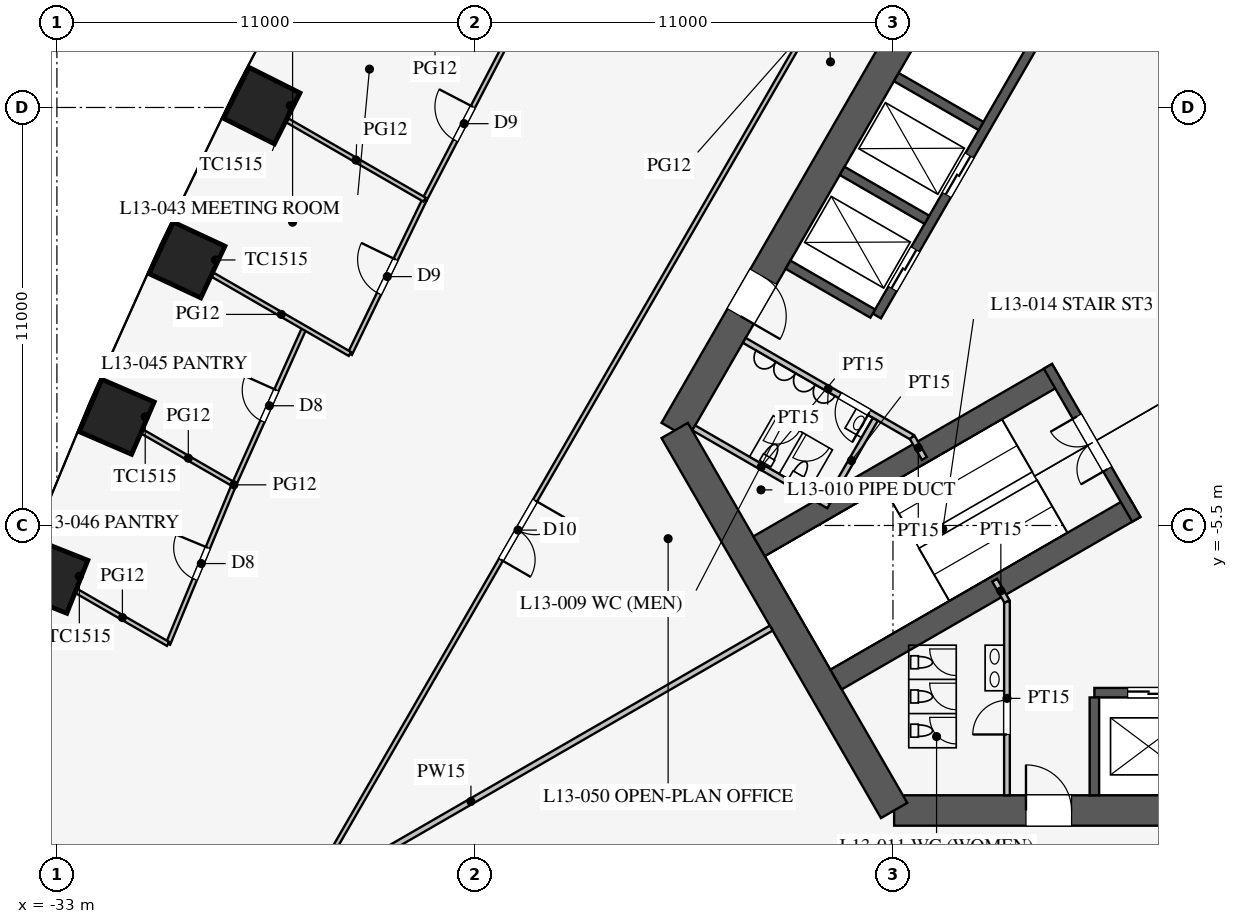
"""IFC4 building model, lengths in metres.
Left out: names, types, materials, properties, quantities, classifications, styles, units other than length and angle.
Written with IfcOpenShell. Run it as: python <this file> out.ifc"""

import sys

from ifc_helpers import new_model, si_unit, direction, frame, frame_2d, origin, origin_2d, place, context, subcontext, project, spatial, rectangle, extrude, element, fill, save


model = new_model("IFC4")
c1 = context("Model", 3, precision=1e-05, world=origin(), true_north=direction((0.0, 1.0)))
c2 = subcontext(c1, "Body", "Model", "MODEL_VIEW")
j1 = project(units=[si_unit("LENGTHUNIT", "METRE"), si_unit("PLANEANGLEUNIT", "RADIAN")], contexts=[c1])
p1 = place(None, origin())
s1 = spatial("IfcSite", under=j1, at=p1, CompositionType="ELEMENT")
p2 = place(p1, origin())
s2 = spatial("IfcBuilding", under=s1, at=p2, CompositionType="ELEMENT")
p3 = place(p2, frame((0.0, 0.0, 58.5)))
s3 = spatial("IfcBuildingStorey", under=s2, at=p3, CompositionType="ELEMENT", Elevation=58.5)
for number, where, z_axis, x_axis in (
    (1, (-27.611, 5.549, 0.0), (0.0, 0.0, 1.0), (-0.449, -0.894, 0.0)),
    (2, (-29.576, 1.487, 0.0), (0.0, 0.0, 1.0), (-0.423, -0.906, 0.0)),
    (3, (-31.426, -2.641, 0.0), (0.0, 0.0, 1.0), (-0.396, -0.918, 0.0)),
    (4, (-33.16, -6.836, 0.0), (0.0, 0.0, 1.0), (-0.369, -0.929, 0.0)),
):
    element("IfcColumn", number, at=place(p3, frame(where, z_axis=z_axis, x_axis=x_axis)), inside=s3, PredefinedType="COLUMN", context=c2, shape_type="SweptSolid", body=[
        extrude(rectangle(XDim=1.5, YDim=1.5, at=origin_2d()), origin(), (0.0, 0.0, 1.0), 4.2),
    ])
p4 = place(p3, frame((-10.97, -13.0, 0.0), z_axis=(0.0, 0.0, 1.0), x_axis=(1.0, 0.0, 0.0)))
e5 = element("IfcWall", 5, at=p4, inside=s3, PredefinedType="SHEAR", context=c2, shape_type="SweptSolid", body=[
    extrude(rectangle(XDim=21.939, YDim=0.8, at=frame_2d((10.97, 0.0))), origin(), (0.0, 0.0, 1.0), 4.2),
])
p5 = place(p4, frame((17.27, 0.0, 0.0)))
e6 = element("IfcOpeningElement", 6, at=p5, cuts=e5, PredefinedType="OPENING", context=c2, shape_type="SweptSolid", body=[
    extrude(rectangle(XDim=1.2, YDim=2.1, at=frame_2d((0.6, 1.05))), frame((0.0, 0.41, 0.0), z_axis=(0.0, -1.0, 0.0), x_axis=(1.0, 0.0, 0.0)), (0.0, 0.0, 1.0), 0.82),
])
p6 = place(p4, frame((3.47, 0.0, 0.0)))
e7 = element("IfcOpeningElement", 7, at=p6, cuts=e5, PredefinedType="OPENING", context=c2, shape_type="SweptSolid", body=[
    extrude(rectangle(XDim=1.2, YDim=2.1, at=frame_2d((0.6, 1.05))), frame((0.0, 0.41, 0.0), z_axis=(0.0, -1.0, 0.0), x_axis=(1.0, 0.0, 0.0)), (0.0, 0.0, 1.0), 0.82),
])
p7 = place(p3, frame((-5.773, 16.0, 0.0), z_axis=(0.0, 0.0, 1.0), x_axis=(-0.500002442456, -0.866023993627, 0.0)))
e8 = element("IfcWall", 8, at=p7, inside=s3, PredefinedType="SHEAR", context=c2, shape_type="SweptSolid", body=[
    extrude(rectangle(XDim=21.939, YDim=0.8, at=frame_2d((10.97, 0.0))), origin(), (0.0, 0.0, 1.0), 4.2),
])
p8 = place(p7, frame((17.27, 0.0, 0.0)))
e9 = element("IfcOpeningElement", 9, at=p8, cuts=e8, PredefinedType="OPENING", context=c2, shape_type="SweptSolid", body=[
    extrude(rectangle(XDim=1.2, YDim=2.1, at=frame_2d((0.6, 1.05))), frame((0.0, 0.41, 0.0), z_axis=(0.0, -1.0, 0.0), x_axis=(1.0, 0.0, 0.0)), (0.0, 0.0, 1.0), 0.82),
])
p9 = place(p7, frame((3.47, 0.0, 0.0)))
e10 = element("IfcOpeningElement", 10, at=p9, cuts=e8, PredefinedType="OPENING", context=c2, shape_type="SweptSolid", body=[
    extrude(rectangle(XDim=1.2, YDim=2.1, at=frame_2d((0.6, 1.05))), frame((0.0, 0.41, 0.0), z_axis=(0.0, -1.0, 0.0), x_axis=(1.0, 0.0, 0.0)), (0.0, 0.0, 1.0), 0.82),
])
p10 = place(p3, frame((-16.743, -3.0, 0.0), z_axis=(0.0, 0.0, 1.0), x_axis=(0.499995765644, -0.866027848477, 0.0)))
e11 = element("IfcWall", 11, at=p10, inside=s3, PredefinedType="SHEAR", context=c2, shape_type="SweptSolid", body=[
    extrude(rectangle(XDim=11.547, YDim=0.8, at=frame_2d((5.773, 0.0))), origin(), (0.0, 0.0, 1.0), 4.2),
])
p11 = place(p3, frame((-5.7, -9.9, 0.0), z_axis=(0.0, 0.0, 1.0), x_axis=(1.0, 0.0, 0.0)))
e12 = element("IfcWall", 12, at=p11, inside=s3, PredefinedType="SHEAR", context=c2, shape_type="SweptSolid", body=[
    extrude(rectangle(XDim=11.4, YDim=0.25, at=frame_2d((5.7, 0.0))), origin(), (0.0, 0.0, 1.0), 4.2),
])
p12 = place(p11, frame((0.875, 0.0, 0.0)))
e13 = element("IfcOpeningElement", 13, at=p12, cuts=e12, PredefinedType="OPENING", context=c2, shape_type="SweptSolid", body=[
    extrude(rectangle(XDim=1.1, YDim=2.2, at=frame_2d((0.55, 1.1))), frame((0.0, 0.135, 0.0), z_axis=(0.0, -1.0, 0.0), x_axis=(1.0, 0.0, 0.0)), (0.0, 0.0, 1.0), 0.27),
])
p13 = place(p11, frame((3.725, 0.0, 0.0)))
e14 = element("IfcOpeningElement", 14, at=p13, cuts=e12, PredefinedType="OPENING", context=c2, shape_type="SweptSolid", body=[
    extrude(rectangle(XDim=1.1, YDim=2.2, at=frame_2d((0.55, 1.1))), frame((0.0, 0.135, 0.0), z_axis=(0.0, -1.0, 0.0), x_axis=(1.0, 0.0, 0.0)), (0.0, 0.0, 1.0), 0.27),
])
p14 = place(p11, frame((6.575, 0.0, 0.0)))
e15 = element("IfcOpeningElement", 15, at=p14, cuts=e12, PredefinedType="OPENING", context=c2, shape_type="SweptSolid", body=[
    extrude(rectangle(XDim=1.1, YDim=2.2, at=frame_2d((0.55, 1.1))), frame((0.0, 0.135, 0.0), z_axis=(0.0, -1.0, 0.0), x_axis=(1.0, 0.0, 0.0)), (0.0, 0.0, 1.0), 0.27),
])
p15 = place(p11, frame((9.425, 0.0, 0.0)))
e16 = element("IfcOpeningElement", 16, at=p15, cuts=e12, PredefinedType="OPENING", context=c2, shape_type="SweptSolid", body=[
    extrude(rectangle(XDim=1.1, YDim=2.2, at=frame_2d((0.55, 1.1))), frame((0.0, 0.135, 0.0), z_axis=(0.0, -1.0, 0.0), x_axis=(1.0, 0.0, 0.0)), (0.0, 0.0, 1.0), 0.27),
])
p16 = place(p3, frame((-5.7, -10.025, 0.0), z_axis=(0.0, 0.0, 1.0), x_axis=(0.0, -1.0, 0.0)))
e17 = element("IfcWall", 17, at=p16, inside=s3, PredefinedType="SHEAR", context=c2, shape_type="SweptSolid", body=[
    extrude(rectangle(XDim=2.575, YDim=0.25, at=frame_2d((1.288, 0.0))), origin(), (0.0, 0.0, 1.0), 4.2),
])
p17 = place(p3, frame((-5.724, 9.886, 0.0), z_axis=(0.0, 0.0, 1.0), x_axis=(-0.500001763848, -0.866024385424, 0.0)))
e18 = element("IfcWall", 18, at=p17, inside=s3, PredefinedType="SHEAR", context=c2, shape_type="SweptSolid", body=[
    extrude(rectangle(XDim=11.4, YDim=0.25, at=frame_2d((5.7, 0.0))), origin(), (0.0, 0.0, 1.0), 4.2),
])
p18 = place(p17, frame((6.525, 0.0, 0.0)))
e19 = element("IfcOpeningElement", 19, at=p18, cuts=e18, PredefinedType="OPENING", context=c2, shape_type="SweptSolid", body=[
    extrude(rectangle(XDim=1.2, YDim=2.2, at=frame_2d((0.6, 1.1))), frame((0.0, 0.135, 0.0), z_axis=(0.0, -1.0, 0.0), x_axis=(1.0, 0.0, 0.0)), (0.0, 0.0, 1.0), 0.27),
])
p19 = place(p17, frame((9.375, 0.0, 0.0)))
e20 = element("IfcOpeningElement", 20, at=p19, cuts=e18, PredefinedType="OPENING", context=c2, shape_type="SweptSolid", body=[
    extrude(rectangle(XDim=1.2, YDim=2.2, at=frame_2d((0.6, 1.1))), frame((0.0, 0.135, 0.0), z_axis=(0.0, -1.0, 0.0), x_axis=(1.0, 0.0, 0.0)), (0.0, 0.0, 1.0), 0.27),
])
for number, where, z_axis, x_axis in (
    (21, (-8.682, 5.012, 0.0), (0.0, 0.0, 1.0), (-0.866, 0.5, 0.0)),
    (22, (-10.107, 2.544, 0.0), (0.0, 0.0, 1.0), (-0.866, 0.5, 0.0)),
    (23, (-11.532, 0.076, 0.0), (0.0, 0.0, 1.0), (-0.866, 0.5, 0.0)),
):
    element("IfcWall", number, at=place(p3, frame(where, z_axis=z_axis, x_axis=x_axis)), inside=s3, PredefinedType="SHEAR", context=c2, shape_type="SweptSolid", body=[
        extrude(rectangle(XDim=2.575, YDim=0.25, at=frame_2d((1.288, 0.0))), origin(), (0.0, 0.0, 1.0), 4.2),
    ])
for number, where, z_axis, x_axis in (
    (24, (-6.663, -1.509, 0.0), (0.0, 0.0, 1.0), (-0.866, -0.5, 0.0)),
    (25, (-4.638, -5.016, 0.0), (0.0, 0.0, 1.0), (-0.866, -0.5, 0.0)),
):
    element("IfcWall", number, at=place(p3, frame(where, z_axis=z_axis, x_axis=x_axis)), inside=s3, PredefinedType="SHEAR", context=c2, shape_type="SweptSolid", body=[
        extrude(rectangle(XDim=9.075, YDim=0.6, at=frame_2d((4.538, 0.0))), origin(), (0.0, 0.0, 1.0), 4.2),
    ])
p20 = place(p3, frame((-6.922, -1.312, 0.0), z_axis=(0.0, 0.0, 1.0), x_axis=(0.499984536904, -0.866034331223, 0.0)))
e26 = element("IfcWall", 26, at=p20, inside=s3, PredefinedType="SHEAR", context=c2, shape_type="SweptSolid", body=[
    extrude(rectangle(XDim=4.65, YDim=0.25, at=frame_2d((2.325, 0.0))), origin(), (0.0, 0.0, 1.0), 4.2),
])
p21 = place(p20, frame((1.525, 0.0, 0.0)))
e27 = element("IfcOpeningElement", 27, at=p21, cuts=e26, PredefinedType="OPENING", context=c2, shape_type="SweptSolid", body=[
    extrude(rectangle(XDim=1.6, YDim=2.1, at=frame_2d((0.8, 1.05))), frame((0.0, 0.135, 0.0), z_axis=(0.0, -1.0, 0.0), x_axis=(1.0, 0.0, 0.0)), (0.0, 0.0, 1.0), 0.27),
])
p22 = place(p3, frame((-8.0, -7.5, 0.0), z_axis=(0.0, 0.0, 1.0), x_axis=(0.0, -1.0, 0.0)))
e28 = element("IfcWall", 28, at=p22, inside=s3, PredefinedType="PARTITIONING", context=c2, shape_type="SweptSolid", body=[
    extrude(rectangle(XDim=5.1, YDim=0.15, at=frame_2d((2.55, 0.0))), origin(), (0.0, 0.0, 1.0), 4.0),
])
p23 = place(p22, frame((2.6, 0.0, 0.0)))
e29 = element("IfcOpeningElement", 29, at=p23, cuts=e28, PredefinedType="OPENING", context=c2, shape_type="SweptSolid", body=[
    extrude(rectangle(XDim=0.9, YDim=2.1, at=frame_2d((0.45, 1.05))), frame((0.0, 0.085, 0.0), z_axis=(0.0, -1.0, 0.0), x_axis=(1.0, 0.0, 0.0)), (0.0, 0.0, 1.0), 0.17),
])
p24 = place(p3, frame((-10.495, -3.178, 0.0), z_axis=(0.0, 0.0, 1.0), x_axis=(-0.86602216432, 0.500005610874, 0.0)))
e30 = element("IfcWall", 30, at=p24, inside=s3, PredefinedType="PARTITIONING", context=c2, shape_type="SweptSolid", body=[
    extrude(rectangle(XDim=5.1, YDim=0.15, at=frame_2d((2.55, 0.0))), origin(), (0.0, 0.0, 1.0), 4.0),
])
p25 = place(p24, frame((1.3, 0.0, 0.0)))
e31 = element("IfcOpeningElement", 31, at=p25, cuts=e30, PredefinedType="OPENING", context=c2, shape_type="SweptSolid", body=[
    extrude(rectangle(XDim=0.9, YDim=2.1, at=frame_2d((0.45, 1.05))), frame((0.0, 0.085, 0.0), z_axis=(0.0, -1.0, 0.0), x_axis=(1.0, 0.0, 0.0)), (0.0, 0.0, 1.0), 0.17),
])
for number, where, z_axis, x_axis in (
    (32, (-10.495, -3.178, 0.0), (0.0, 0.0, 1.0), (0.5, -0.866, 0.0)),
    (33, (-8.0, -7.5, 0.0), (0.0, 0.0, 1.0), (-0.5, 0.866, 0.0)),
):
    element("IfcWall", number, at=place(p3, frame(where, z_axis=z_axis, x_axis=x_axis)), inside=s3, PredefinedType="PARTITIONING", context=c2, shape_type="SweptSolid", body=[
        extrude(rectangle(XDim=0.645, YDim=0.15, at=frame_2d((0.323, 0.0))), origin(), (0.0, 0.0, 1.0), 4.0),
    ])
p26 = place(p3, frame((-12.691, -4.982, 0.0), z_axis=(0.0, 0.0, 1.0), x_axis=(-0.8660249478, 0.500000789788, 0.0)))
e34 = element("IfcWall", 34, at=p26, inside=s3, PredefinedType="PARTITIONING", context=c2, shape_type="SweptSolid", body=[
    extrude(rectangle(XDim=4.1, YDim=0.15, at=frame_2d((2.05, 0.0))), origin(), (0.0, 0.0, 1.0), 4.0),
])
p27 = place(p3, frame((-11.464, -2.706, 0.0), z_axis=(0.0, 0.0, 1.0), x_axis=(-0.50001992892, -0.866013897511, 0.0)))
e35 = element("IfcWall", 35, at=p27, inside=s3, PredefinedType="PARTITIONING", context=c2, shape_type="SweptSolid", body=[
    extrude(rectangle(XDim=2.51, YDim=0.15, at=frame_2d((1.255, 0.0))), origin(), (0.0, 0.0, 1.0), 4.0),
])
p28 = place(p3, frame((-14.203, -8.2, 0.0), z_axis=(0.0, 0.0, 1.0), x_axis=(-0.866024965723, -0.500000758745, 0.0)))
e36 = element("IfcWall", 36, at=p28, inside=s3, PredefinedType="PARTITIONING", context=c2, shape_type="SweptSolid", body=[
    extrude(rectangle(XDim=18.25, YDim=0.15, at=frame_2d((9.125, 0.0))), origin(), (0.0, 0.0, 1.0), 2.3),
])
p29 = place(p3, frame((-0.016, 30.491, 0.0), z_axis=(0.0, 0.0, 1.0), x_axis=(-0.50000091641, -0.866024874695, 0.0)))
e37 = element("IfcWall", 37, at=p29, inside=s3, PredefinedType="PARTITIONING", context=c2, shape_type="SweptSolid", body=[
    extrude(rectangle(XDim=52.796, YDim=0.12, at=frame_2d((26.398, 0.0))), origin(), (0.0, 0.0, 1.0), 2.9),
])
p30 = place(p29, frame((10.2, 0.0, 0.15)))
e38 = element("IfcOpeningElement", 38, at=p30, cuts=e37, PredefinedType="OPENING", context=c2, shape_type="SweptSolid", body=[
    extrude(rectangle(XDim=1.8, YDim=2.1, at=frame_2d((0.9, 1.05))), frame((0.0, 0.07, 0.0), z_axis=(0.0, -1.0, 0.0), x_axis=(1.0, 0.0, 0.0)), (0.0, 0.0, 1.0), 0.14),
])
p31 = place(p29, frame((40.8, 0.0, 0.15)))
e39 = element("IfcOpeningElement", 39, at=p31, cuts=e37, PredefinedType="OPENING", context=c2, shape_type="SweptSolid", body=[
    extrude(rectangle(XDim=1.8, YDim=2.1, at=frame_2d((0.9, 1.05))), frame((0.0, 0.07, 0.0), z_axis=(0.0, -1.0, 0.0), x_axis=(1.0, 0.0, 0.0)), (0.0, 0.0, 1.0), 0.14),
])
p32 = place(p3, frame((-26.487, -0.296, 0.0), z_axis=(0.0, 0.0, 1.0), x_axis=(-0.409451055745, -0.912332084796, 0.0)))
e40 = element("IfcWall", 40, at=p32, inside=s3, PredefinedType="PARTITIONING", context=c2, shape_type="SweptSolid", body=[
    extrude(rectangle(XDim=4.523, YDim=0.12, at=frame_2d((2.262, 0.0))), origin(), (0.0, 0.0, 1.0), 2.9),
])
p33 = place(p32, frame((1.8, 0.0, 0.15)))
e41 = element("IfcOpeningElement", 41, at=p33, cuts=e40, PredefinedType="OPENING", context=c2, shape_type="SweptSolid", body=[
    extrude(rectangle(XDim=0.9, YDim=2.1, at=frame_2d((0.45, 1.05))), frame((0.0, 0.07, 0.0), z_axis=(0.0, -1.0, 0.0), x_axis=(1.0, 0.0, 0.0)), (0.0, 0.0, 1.0), 0.14),
])
p34 = place(p3, frame((-28.339, -4.423, 0.0), z_axis=(0.0, 0.0, 1.0), x_axis=(-0.382639984525, -0.923897527999, 0.0)))
e42 = element("IfcWall", 42, at=p34, inside=s3, PredefinedType="PARTITIONING", context=c2, shape_type="SweptSolid", body=[
    extrude(rectangle(XDim=4.539, YDim=0.12, at=frame_2d((2.27, 0.0))), origin(), (0.0, 0.0, 1.0), 2.9),
])
p35 = place(p34, frame((1.8, 0.0, 0.15)))
e43 = element("IfcOpeningElement", 43, at=p35, cuts=e42, PredefinedType="OPENING", context=c2, shape_type="SweptSolid", body=[
    extrude(rectangle(XDim=0.9, YDim=2.1, at=frame_2d((0.45, 1.05))), frame((0.0, 0.07, 0.0), z_axis=(0.0, -1.0, 0.0), x_axis=(1.0, 0.0, 0.0)), (0.0, 0.0, 1.0), 0.14),
])
p36 = place(p3, frame((-21.245, 7.07, 0.0), z_axis=(0.0, 0.0, 1.0), x_axis=(-0.461852697957, -0.886956642339, 0.0)))
e44 = element("IfcWall", 44, at=p36, inside=s3, PredefinedType="PARTITIONING", context=c2, shape_type="SweptSolid", body=[
    extrude(rectangle(XDim=4.504, YDim=0.12, at=frame_2d((2.252, 0.0))), origin(), (0.0, 0.0, 1.0), 2.9),
])
p37 = place(p36, frame((1.75, 0.0, 0.15)))
e45 = element("IfcOpeningElement", 45, at=p37, cuts=e44, PredefinedType="OPENING", context=c2, shape_type="SweptSolid", body=[
    extrude(rectangle(XDim=1.0, YDim=2.1, at=frame_2d((0.5, 1.05))), frame((0.0, 0.07, 0.0), z_axis=(0.0, -1.0, 0.0), x_axis=(1.0, 0.0, 0.0)), (0.0, 0.0, 1.0), 0.14),
])
p38 = place(p3, frame((-23.325, 3.074, 0.0), z_axis=(0.0, 0.0, 1.0), x_axis=(-0.435857917556, -0.900015486369, 0.0)))
e46 = element("IfcWall", 46, at=p38, inside=s3, PredefinedType="PARTITIONING", context=c2, shape_type="SweptSolid", body=[
    extrude(rectangle(XDim=4.512, YDim=0.12, at=frame_2d((2.256, 0.0))), origin(), (0.0, 0.0, 1.0), 2.9),
])
p39 = place(p38, frame((1.75, 0.0, 0.15)))
e47 = element("IfcOpeningElement", 47, at=p39, cuts=e46, PredefinedType="OPENING", context=c2, shape_type="SweptSolid", body=[
    extrude(rectangle(XDim=1.0, YDim=2.1, at=frame_2d((0.5, 1.05))), frame((0.0, 0.07, 0.0), z_axis=(0.0, -1.0, 0.0), x_axis=(1.0, 0.0, 0.0)), (0.0, 0.0, 1.0), 0.14),
])
p40 = place(p3, frame((-25.292, -0.986, 0.0), z_axis=(0.0, 0.0, 1.0), x_axis=(-0.866011781705, 0.500023593391, 0.0)))
e48 = element("IfcWall", 48, at=p40, inside=s3, PredefinedType="PARTITIONING", context=c2, shape_type="SweptSolid", body=[
    extrude(rectangle(XDim=4.164, YDim=0.12, at=frame_2d((2.082, 0.0))), origin(), (0.0, 0.0, 1.0), 2.6),
])
p41 = place(p3, frame((-28.339, -4.423, 0.0), z_axis=(0.0, 0.0, 1.0), x_axis=(-0.866029066823, 0.499993655377, 0.0)))
e49 = element("IfcWall", 49, at=p41, inside=s3, PredefinedType="PARTITIONING", context=c2, shape_type="SweptSolid", body=[
    extrude(rectangle(XDim=2.779, YDim=0.12, at=frame_2d((1.39, 0.0))), origin(), (0.0, 0.0, 1.0), 2.6),
])
p42 = place(p3, frame((-30.076, -8.617, 0.0), z_axis=(0.0, 0.0, 1.0), x_axis=(-0.866002324719, 0.500039971984, 0.0)))
e50 = element("IfcWall", 50, at=p42, inside=s3, PredefinedType="PARTITIONING", context=c2, shape_type="SweptSolid", body=[
    extrude(rectangle(XDim=2.773, YDim=0.12, at=frame_2d((1.387, 0.0))), origin(), (0.0, 0.0, 1.0), 2.8),
])
p43 = place(p3, frame((-23.325, 3.074, 0.0), z_axis=(0.0, 0.0, 1.0), x_axis=(-0.866009971343, 0.50002672882, 0.0)))
e51 = element("IfcWall", 51, at=p43, inside=s3, PredefinedType="PARTITIONING", context=c2, shape_type="SweptSolid", body=[
    extrude(rectangle(XDim=4.167, YDim=0.12, at=frame_2d((2.083, 0.0))), origin(), (0.0, 0.0, 1.0), 2.8),
])
p44 = place(p23, frame((0.9, 0.0, 0.0), z_axis=(0.0, 0.0, 1.0), x_axis=(-1.0, 0.0, 0.0)))
e52 = element("IfcDoor", 52, at=p44, inside=s3, OperationType="SINGLE_SWING_LEFT", PredefinedType="DOOR", context=c2, shape_type="SweptSolid", body=[
    extrude(rectangle(XDim=0.9, YDim=2.1, at=frame_2d((0.45, 1.05))), frame((0.0, 0.025, 0.0), z_axis=(0.0, -1.0, 0.0), x_axis=(1.0, 0.0, 0.0)), (0.0, 0.0, 1.0), 0.05),
])
fill(e29, e52)
p45 = place(p25, origin())
e53 = element("IfcDoor", 53, at=p45, inside=s3, OperationType="SINGLE_SWING_LEFT", PredefinedType="DOOR", context=c2, shape_type="SweptSolid", body=[
    extrude(rectangle(XDim=0.9, YDim=2.1, at=frame_2d((0.45, 1.05))), frame((0.0, 0.025, 0.0), z_axis=(0.0, -1.0, 0.0), x_axis=(1.0, 0.0, 0.0)), (0.0, 0.0, 1.0), 0.05),
])
fill(e31, e53)
p46 = place(p21, frame((1.6, 0.0, 0.0), z_axis=(0.0, 0.0, 1.0), x_axis=(-1.0, 0.0, 0.0)))
e54 = element("IfcDoor", 54, at=p46, inside=s3, OperationType="DOUBLE_DOOR_SINGLE_SWING", PredefinedType="DOOR", context=c2, shape_type="SweptSolid", body=[
    extrude(rectangle(XDim=1.6, YDim=2.1, at=frame_2d((0.8, 1.05))), frame((0.0, 0.025, 0.0), z_axis=(0.0, -1.0, 0.0), x_axis=(1.0, 0.0, 0.0)), (0.0, 0.0, 1.0), 0.05),
])
fill(e27, e54)
p47 = place(p6, origin())
e55 = element("IfcDoor", 55, at=p47, inside=s3, OperationType="SINGLE_SWING_LEFT", PredefinedType="DOOR", context=c2, shape_type="SweptSolid", body=[
    extrude(rectangle(XDim=1.2, YDim=2.1, at=frame_2d((0.6, 1.05))), frame((0.0, 0.025, 0.0), z_axis=(0.0, -1.0, 0.0), x_axis=(1.0, 0.0, 0.0)), (0.0, 0.0, 1.0), 0.05),
])
fill(e7, e55)
p48 = place(p8, origin())
e56 = element("IfcDoor", 56, at=p48, inside=s3, OperationType="SINGLE_SWING_RIGHT", PredefinedType="DOOR", context=c2, shape_type="SweptSolid", body=[
    extrude(rectangle(XDim=1.2, YDim=2.1, at=frame_2d((0.6, 1.05))), frame((0.0, 0.025, 0.0), z_axis=(0.0, -1.0, 0.0), x_axis=(1.0, 0.0, 0.0)), (0.0, 0.0, 1.0), 0.05),
])
fill(e9, e56)
p49 = place(p37, frame((1.0, 0.0, 0.0), z_axis=(0.0, 0.0, 1.0), x_axis=(-1.0, 0.0, 0.0)))
e57 = element("IfcDoor", 57, at=p49, inside=s3, OperationType="SINGLE_SWING_RIGHT", PredefinedType="DOOR", context=c2, shape_type="SweptSolid", body=[
    extrude(rectangle(XDim=1.0, YDim=2.1, at=frame_2d((0.5, 1.05))), frame((0.0, 0.025, 0.0), z_axis=(0.0, -1.0, 0.0), x_axis=(1.0, 0.0, 0.0)), (0.0, 0.0, 1.0), 0.05),
])
fill(e45, e57)
p50 = place(p39, frame((1.0, 0.0, 0.0), z_axis=(0.0, 0.0, 1.0), x_axis=(-1.0, 0.0, 0.0)))
e58 = element("IfcDoor", 58, at=p50, inside=s3, OperationType="SINGLE_SWING_RIGHT", PredefinedType="DOOR", context=c2, shape_type="SweptSolid", body=[
    extrude(rectangle(XDim=1.0, YDim=2.1, at=frame_2d((0.5, 1.05))), frame((0.0, 0.025, 0.0), z_axis=(0.0, -1.0, 0.0), x_axis=(1.0, 0.0, 0.0)), (0.0, 0.0, 1.0), 0.05),
])
fill(e47, e58)
p51 = place(p33, frame((0.9, 0.0, 0.0), z_axis=(0.0, 0.0, 1.0), x_axis=(-1.0, 0.0, 0.0)))
e59 = element("IfcDoor", 59, at=p51, inside=s3, OperationType="SINGLE_SWING_RIGHT", PredefinedType="DOOR", context=c2, shape_type="SweptSolid", body=[
    extrude(rectangle(XDim=0.9, YDim=2.1, at=frame_2d((0.45, 1.05))), frame((0.0, 0.025, 0.0), z_axis=(0.0, -1.0, 0.0), x_axis=(1.0, 0.0, 0.0)), (0.0, 0.0, 1.0), 0.05),
])
fill(e41, e59)
p52 = place(p35, frame((0.9, 0.0, 0.0), z_axis=(0.0, 0.0, 1.0), x_axis=(-1.0, 0.0, 0.0)))
e60 = element("IfcDoor", 60, at=p52, inside=s3, OperationType="SINGLE_SWING_RIGHT", PredefinedType="DOOR", context=c2, shape_type="SweptSolid", body=[
    extrude(rectangle(XDim=0.9, YDim=2.1, at=frame_2d((0.45, 1.05))), frame((0.0, 0.025, 0.0), z_axis=(0.0, -1.0, 0.0), x_axis=(1.0, 0.0, 0.0)), (0.0, 0.0, 1.0), 0.05),
])
fill(e43, e60)
p53 = place(p31, origin())
e61 = element("IfcDoor", 61, at=p53, inside=s3, OperationType="DOUBLE_DOOR_SINGLE_SWING", PredefinedType="DOOR", context=c2, shape_type="SweptSolid", body=[
    extrude(rectangle(XDim=1.8, YDim=2.1, at=frame_2d((0.9, 1.05))), frame((0.0, 0.025, 0.0), z_axis=(0.0, -1.0, 0.0), x_axis=(1.0, 0.0, 0.0)), (0.0, 0.0, 1.0), 0.05),
])
fill(e39, e61)
p54 = place(p12, origin())
e62 = element("IfcDoor", 62, at=p54, inside=s3, OperationType="DOUBLE_DOOR_SLIDING", PredefinedType="DOOR", context=c2, shape_type="SweptSolid", body=[
    extrude(rectangle(XDim=1.1, YDim=2.2, at=frame_2d((0.55, 1.1))), frame((0.0, 0.025, 0.0), z_axis=(0.0, -1.0, 0.0), x_axis=(1.0, 0.0, 0.0)), (0.0, 0.0, 1.0), 0.05),
])
fill(e13, e62)
p55 = place(p18, origin())
e63 = element("IfcDoor", 63, at=p55, inside=s3, OperationType="DOUBLE_DOOR_SLIDING", PredefinedType="DOOR", context=c2, shape_type="SweptSolid", body=[
    extrude(rectangle(XDim=1.2, YDim=2.2, at=frame_2d((0.6, 1.1))), frame((0.0, 0.025, 0.0), z_axis=(0.0, -1.0, 0.0), x_axis=(1.0, 0.0, 0.0)), (0.0, 0.0, 1.0), 0.05),
])
fill(e19, e63)
p56 = place(p19, origin())
e64 = element("IfcDoor", 64, at=p56, inside=s3, OperationType="DOUBLE_DOOR_SLIDING", PredefinedType="DOOR", context=c2, shape_type="SweptSolid", body=[
    extrude(rectangle(XDim=1.2, YDim=2.2, at=frame_2d((0.6, 1.1))), frame((0.0, 0.025, 0.0), z_axis=(0.0, -1.0, 0.0), x_axis=(1.0, 0.0, 0.0)), (0.0, 0.0, 1.0), 0.05),
])
fill(e20, e64)
save(model, sys.argv[1])
